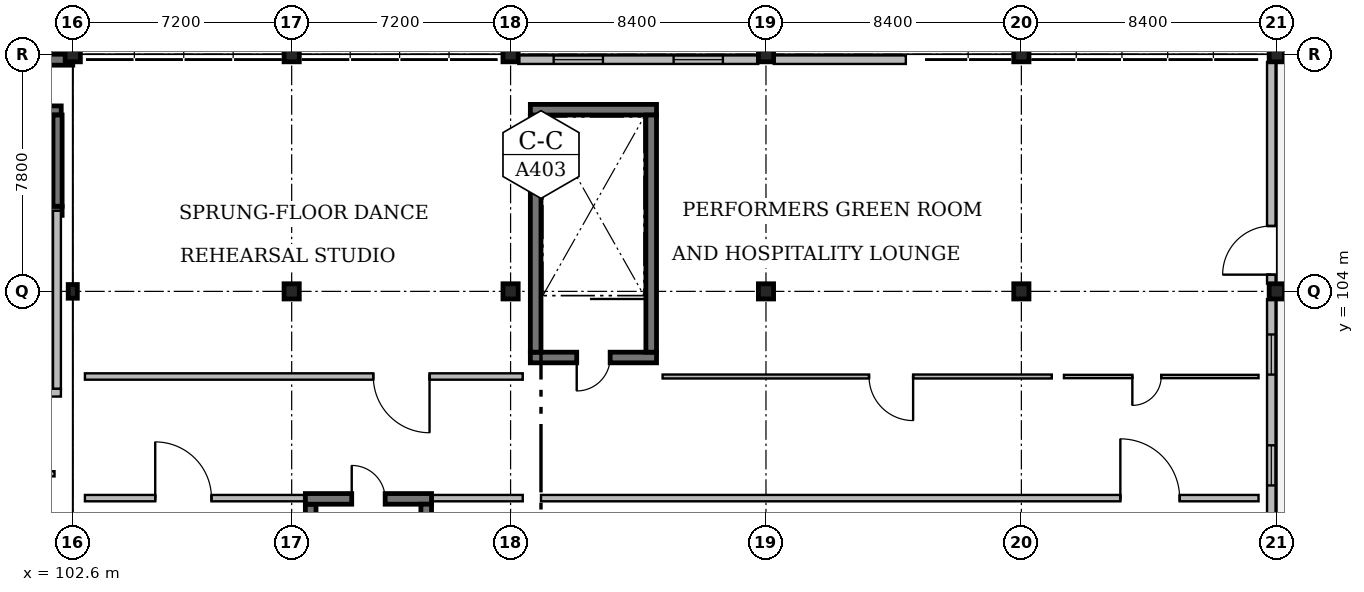
"""IFC4 building model, lengths in metres.
Left out: names, types, materials, properties, quantities, classifications, styles, units other than length and angle.
Written with IfcOpenShell. Run it as: python <this file> out.ifc"""

import sys

from ifc_helpers import new_model, si_unit, direction, frame, frame_2d, origin, origin_2d, place, context, subcontext, project, spatial, rectangle, i_section, extrude, element, fill, save


model = new_model("IFC4")
c1 = context("Model", 3, precision=1e-05, world=origin(), true_north=direction((0.0, 1.0)))
c2 = subcontext(c1, "Body", "Model", "MODEL_VIEW")
j1 = project(units=[si_unit("LENGTHUNIT", "METRE"), si_unit("PLANEANGLEUNIT", "RADIAN")], contexts=[c1])
p1 = place(None, origin())
s1 = spatial("IfcSite", under=j1, at=p1, CompositionType="ELEMENT")
p2 = place(p1, origin())
s2 = spatial("IfcBuilding", under=s1, at=p2, CompositionType="ELEMENT")
p3 = place(p2, frame((0.0, 0.0, 13.2)))
s3 = spatial("IfcBuildingStorey", under=s2, at=p3, CompositionType="ELEMENT", Elevation=13.2)
p4 = place(p3, frame((102.6, 104.0, 0.0), z_axis=(0.0, 0.0, 1.0), x_axis=(1.0, 0.0, 0.0)))
e1 = element("IfcColumn", 1, at=p4, inside=s3, PredefinedType="COLUMN", context=c2, shape_type="SweptSolid", body=[
    extrude(i_section(OverallWidth=0.3, OverallDepth=0.45, WebThickness=0.014, FlangeThickness=0.026, FilletRadius=0.027, at=origin_2d()), origin(), (0.0, 0.0, 1.0), 3.9),
])
p5 = place(p3, frame((102.6, 111.8, 0.0), z_axis=(0.0, 0.0, 1.0), x_axis=(1.0, 0.0, 0.0)))
e2 = element("IfcColumn", 2, at=p5, inside=s3, PredefinedType="COLUMN", context=c2, shape_type="SweptSolid", body=[
    extrude(rectangle(XDim=0.5, YDim=0.5, at=origin_2d()), origin(), (0.0, 0.0, 1.0), 3.9),
])
for number, where, z_axis, x_axis in (
    (3, (109.8, 104.0, 0.0), (0.0, 0.0, 1.0), (1.0, 0.0, 0.0)),
    (4, (109.8, 111.8, 0.0), (0.0, 0.0, 1.0), (1.0, 0.0, 0.0)),
    (5, (117.0, 104.0, 0.0), (0.0, 0.0, 1.0), (1.0, 0.0, 0.0)),
    (6, (117.0, 111.8, 0.0), (0.0, 0.0, 1.0), (1.0, 0.0, 0.0)),
    (7, (125.4, 104.0, 0.0), (0.0, 0.0, 1.0), (1.0, 0.0, 0.0)),
    (8, (125.4, 111.8, 0.0), (0.0, 0.0, 1.0), (1.0, 0.0, 0.0)),
    (9, (133.8, 104.0, 0.0), (0.0, 0.0, 1.0), (1.0, 0.0, 0.0)),
    (10, (133.8, 111.8, 0.0), (0.0, 0.0, 1.0), (1.0, 0.0, 0.0)),
    (11, (142.2, 104.0, 0.0), (0.0, 0.0, 1.0), (1.0, 0.0, 0.0)),
    (12, (142.2, 111.8, 0.0), (0.0, 0.0, 1.0), (1.0, 0.0, 0.0)),
):
    element("IfcColumn", number, at=place(p3, frame(where, z_axis=z_axis, x_axis=x_axis)), inside=s3, PredefinedType="COLUMN", context=c2, shape_type="SweptSolid", body=[
        extrude(rectangle(XDim=0.5, YDim=0.5, at=origin_2d()), origin(), (0.0, 0.0, 1.0), 3.71),
    ])
p6 = place(p3, frame((102.25, 106.65, 0.0), z_axis=(0.0, 0.0, 1.0), x_axis=(-1.0, 0.0, 0.0)))
e13 = element("IfcWall", 13, at=p6, inside=s3, PredefinedType="SOLIDWALL", context=c2, shape_type="SweptSolid", body=[
    extrude(rectangle(XDim=3.6, YDim=0.3, at=frame_2d((1.8, 0.0))), origin(), (0.0, 0.0, 1.0), 3.9),
])
p7 = place(p6, frame((1.25, 0.0, 0.0)))
e14 = element("IfcOpeningElement", 14, at=p7, cuts=e13, PredefinedType="OPENING", context=c2, shape_type="SweptSolid", body=[
    extrude(rectangle(XDim=1.1, YDim=2.1, at=frame_2d((0.55, 1.05))), frame((0.0, 0.17, 0.0), z_axis=(0.0, -1.0, 0.0), x_axis=(1.0, 0.0, 0.0)), (0.0, 0.0, 1.0), 0.34),
])
p8 = place(p3, frame((98.65, 109.95, 0.0), z_axis=(0.0, 0.0, 1.0), x_axis=(1.0, 0.0, 0.0)))
e15 = element("IfcWall", 15, at=p8, inside=s3, PredefinedType="SOLIDWALL", context=c2, shape_type="SweptSolid", body=[
    extrude(rectangle(XDim=3.57, YDim=0.3, at=frame_2d((1.785, 0.0))), origin(), (0.0, 0.0, 1.0), 3.9),
])
p9 = place(p3, frame((102.1, 109.8, 0.0), z_axis=(0.0, 0.0, 1.0), x_axis=(0.0, -1.0, 0.0)))
e16 = element("IfcWall", 16, at=p9, inside=s3, PredefinedType="SOLIDWALL", context=c2, shape_type="SweptSolid", body=[
    extrude(rectangle(XDim=3.0, YDim=0.3, at=frame_2d((1.5, 0.0))), origin(), (0.0, 0.0, 1.0), 3.9),
])
p10 = place(p3, frame((102.21, 100.67, 0.0), z_axis=(0.0, 0.0, 1.0), x_axis=(-1.0, 0.0, 0.0)))
e17 = element("IfcWall", 17, at=p10, inside=s3, PredefinedType="SOLIDWALL", context=c2, shape_type="SweptSolid", body=[
    extrude(rectangle(XDim=3.96, YDim=0.26, at=frame_2d((1.98, 0.0))), origin(), (0.0, 0.0, 1.0), 3.65),
])
p11 = place(p10, frame((1.1, 0.0, 0.0)))
e18 = element("IfcOpeningElement", 18, at=p11, cuts=e17, PredefinedType="OPENING", context=c2, shape_type="SweptSolid", body=[
    extrude(rectangle(XDim=1.15, YDim=2.2, at=frame_2d((0.575, 1.1))), frame((0.0, 0.15, 0.0), z_axis=(0.0, -1.0, 0.0), x_axis=(1.0, 0.0, 0.0)), (0.0, 0.0, 1.0), 0.3),
])
p12 = place(p3, frame((102.08, 106.65, 0.0), z_axis=(0.0, 0.0, 1.0), x_axis=(0.0, -1.0, 0.0)))
e19 = element("IfcWall", 19, at=p12, inside=s3, PredefinedType="SOLIDWALL", context=c2, shape_type="SweptSolid", body=[
    extrude(rectangle(XDim=5.85, YDim=0.26, at=frame_2d((2.925, 0.0))), origin(), (0.0, 0.0, 1.0), 3.65),
])
p13 = place(p3, frame((121.8, 101.825, 0.0), z_axis=(0.0, 0.0, 1.0), x_axis=(-1.0, 0.0, 0.0)))
e20 = element("IfcWall", 20, at=p13, inside=s3, PredefinedType="SOLIDWALL", context=c2, shape_type="SweptSolid", body=[
    extrude(rectangle(XDim=4.15, YDim=0.35, at=frame_2d((2.075, 0.0))), origin(), (0.0, 0.0, 1.0), 3.6),
])
p14 = place(p13, frame((1.525, 0.0, 0.0)))
e21 = element("IfcOpeningElement", 21, at=p14, cuts=e20, PredefinedType="OPENING", context=c2, shape_type="SweptSolid", body=[
    extrude(rectangle(XDim=1.1, YDim=2.15, at=frame_2d((0.55, 1.075))), frame((0.0, 0.195, 0.0), z_axis=(0.0, -1.0, 0.0), x_axis=(1.0, 0.0, 0.0)), (0.0, 0.0, 1.0), 0.39),
])
p15 = place(p3, frame((117.825, 102.0, 0.0), z_axis=(0.0, 0.0, 1.0), x_axis=(0.0, 1.0, 0.0)))
e22 = element("IfcWall", 22, at=p15, inside=s3, PredefinedType="SOLIDWALL", context=c2, shape_type="SweptSolid", body=[
    extrude(rectangle(XDim=7.8, YDim=0.35, at=frame_2d((3.9, 0.0))), origin(), (0.0, 0.0, 1.0), 3.6),
])
p16 = place(p3, frame((117.65, 109.975, 0.0), z_axis=(0.0, 0.0, 1.0), x_axis=(1.0, 0.0, 0.0)))
e23 = element("IfcWall", 23, at=p16, inside=s3, PredefinedType="SOLIDWALL", context=c2, shape_type="SweptSolid", body=[
    extrude(rectangle(XDim=4.15, YDim=0.35, at=frame_2d((2.075, 0.0))), origin(), (0.0, 0.0, 1.0), 3.6),
])
for number, where, z_axis, x_axis in (
    (24, (121.625, 109.8, 0.0), (0.0, 0.0, 1.0), (0.0, -1.0, 0.0)),
    (25, (110.425, 89.2, 0.0), (0.0, 0.0, 1.0), (0.0, 1.0, 0.0)),
):
    element("IfcWall", number, at=place(p3, frame(where, z_axis=z_axis, x_axis=x_axis)), inside=s3, PredefinedType="SOLIDWALL", context=c2, shape_type="SweptSolid", body=[
        extrude(rectangle(XDim=7.8, YDim=0.35, at=frame_2d((3.9, 0.0))), origin(), (0.0, 0.0, 1.0), 3.6),
    ])
p17 = place(p3, frame((110.25, 97.175, 0.0), z_axis=(0.0, 0.0, 1.0), x_axis=(1.0, 0.0, 0.0)))
e26 = element("IfcWall", 26, at=p17, inside=s3, PredefinedType="SOLIDWALL", context=c2, shape_type="SweptSolid", body=[
    extrude(rectangle(XDim=4.15, YDim=0.35, at=frame_2d((2.075, 0.0))), origin(), (0.0, 0.0, 1.0), 3.6),
])
p18 = place(p17, frame((1.525, 0.0, 0.0)))
e27 = element("IfcOpeningElement", 27, at=p18, cuts=e26, PredefinedType="OPENING", context=c2, shape_type="SweptSolid", body=[
    extrude(rectangle(XDim=1.1, YDim=2.15, at=frame_2d((0.55, 1.075))), frame((0.0, 0.195, 0.0), z_axis=(0.0, -1.0, 0.0), x_axis=(1.0, 0.0, 0.0)), (0.0, 0.0, 1.0), 0.39),
])
p19 = place(p3, frame((114.225, 97.0, 0.0), z_axis=(0.0, 0.0, 1.0), x_axis=(0.0, -1.0, 0.0)))
e28 = element("IfcWall", 28, at=p19, inside=s3, PredefinedType="SOLIDWALL", context=c2, shape_type="SweptSolid", body=[
    extrude(rectangle(XDim=7.8, YDim=0.35, at=frame_2d((3.9, 0.0))), origin(), (0.0, 0.0, 1.0), 3.6),
])
p20 = place(p3, frame((57.6, 111.62, 0.0), z_axis=(0.0, 0.0, 1.0), x_axis=(1.0, 0.0, 0.0)))
e29 = element("IfcWall", 29, at=p20, inside=s3, PredefinedType="SOLIDWALL", context=c2, shape_type="SweptSolid", body=[
    extrude(rectangle(XDim=45.0, YDim=0.36, at=frame_2d((22.5, 0.0))), origin(), (0.0, 0.0, 1.0), 3.65),
])
p21 = place(p3, frame((117.255, 111.62, 0.0), z_axis=(0.0, 0.0, 1.0), x_axis=(1.0, 0.0, 0.0)))
e30 = element("IfcWall", 30, at=p21, inside=s3, PredefinedType="SOLIDWALL", context=c2, shape_type="SweptSolid", body=[
    extrude(rectangle(XDim=7.89, YDim=0.28, at=frame_2d((3.945, 0.0))), origin(), (0.0, 0.0, 1.0), 2.993),
])
p22 = place(p21, frame((1.163, 0.0, 0.95)))
e31 = element("IfcOpeningElement", 31, at=p22, cuts=e30, PredefinedType="OPENING", context=c2, shape_type="SweptSolid", body=[
    extrude(rectangle(XDim=1.62, YDim=1.75, at=frame_2d((0.81, 0.875))), frame((0.0, 0.16, 0.0), z_axis=(0.0, -1.0, 0.0), x_axis=(1.0, 0.0, 0.0)), (0.0, 0.0, 1.0), 0.32),
])
p23 = place(p21, frame((5.107, 0.0, 0.95)))
e32 = element("IfcOpeningElement", 32, at=p23, cuts=e30, PredefinedType="OPENING", context=c2, shape_type="SweptSolid", body=[
    extrude(rectangle(XDim=1.62, YDim=1.75, at=frame_2d((0.81, 0.875))), frame((0.0, 0.16, 0.0), z_axis=(0.0, -1.0, 0.0), x_axis=(1.0, 0.0, 0.0)), (0.0, 0.0, 1.0), 0.32),
])
p24 = place(p3, frame((125.655, 111.62, 0.0), z_axis=(0.0, 0.0, 1.0), x_axis=(1.0, 0.0, 0.0)))
e33 = element("IfcWall", 33, at=p24, inside=s3, PredefinedType="SOLIDWALL", context=c2, shape_type="SweptSolid", body=[
    extrude(rectangle(XDim=4.345, YDim=0.28, at=frame_2d((2.172, 0.0))), origin(), (0.0, 0.0, 1.0), 2.993),
])
p25 = place(p3, frame((142.02, 96.455, 0.0), z_axis=(0.0, 0.0, 1.0), x_axis=(0.0, 1.0, 0.0)))
e34 = element("IfcWall", 34, at=p25, inside=s3, PredefinedType="SOLIDWALL", context=c2, shape_type="SweptSolid", body=[
    extrude(rectangle(XDim=7.29, YDim=0.28, at=frame_2d((3.645, 0.0))), origin(), (0.0, 0.0, 1.0), 3.283),
])
p26 = place(p25, frame((1.163, 0.0, 0.95)))
e35 = element("IfcOpeningElement", 35, at=p26, cuts=e34, PredefinedType="OPENING", context=c2, shape_type="SweptSolid", body=[
    extrude(rectangle(XDim=1.32, YDim=1.65, at=frame_2d((0.66, 0.825))), frame((0.0, 0.16, 0.0), z_axis=(0.0, -1.0, 0.0), x_axis=(1.0, 0.0, 0.0)), (0.0, 0.0, 1.0), 0.32),
])
p27 = place(p25, frame((4.808, 0.0, 0.95)))
e36 = element("IfcOpeningElement", 36, at=p27, cuts=e34, PredefinedType="OPENING", context=c2, shape_type="SweptSolid", body=[
    extrude(rectangle(XDim=1.32, YDim=1.65, at=frame_2d((0.66, 0.825))), frame((0.0, 0.16, 0.0), z_axis=(0.0, -1.0, 0.0), x_axis=(1.0, 0.0, 0.0)), (0.0, 0.0, 1.0), 0.32),
])
p28 = place(p3, frame((142.02, 104.255, 0.0), z_axis=(0.0, 0.0, 1.0), x_axis=(0.0, 1.0, 0.0)))
e37 = element("IfcWall", 37, at=p28, inside=s3, PredefinedType="SOLIDWALL", context=c2, shape_type="SweptSolid", body=[
    extrude(rectangle(XDim=7.29, YDim=0.28, at=frame_2d((3.645, 0.0))), origin(), (0.0, 0.0, 1.0), 3.283),
])
p29 = place(p28, frame((0.295, 0.0, 0.0)))
e38 = element("IfcOpeningElement", 38, at=p29, cuts=e37, PredefinedType="OPENING", context=c2, shape_type="SweptSolid", body=[
    extrude(rectangle(XDim=1.6, YDim=2.2, at=frame_2d((0.8, 1.1))), frame((0.0, 0.16, 0.0), z_axis=(0.0, -1.0, 0.0), x_axis=(1.0, 0.0, 0.0)), (0.0, 0.0, 1.0), 0.32),
])
p30 = place(p3, frame((90.2, 98.0, 0.0), z_axis=(0.0, 0.0, 1.0), x_axis=(1.0, 0.0, 0.0)))
e39 = element("IfcWall", 39, at=p30, inside=s3, PredefinedType="PARTITIONING", context=c2, shape_type="SweptSolid", body=[
    extrude(rectangle(XDim=11.8, YDim=0.17, at=frame_2d((5.9, 0.0))), origin(), (0.0, 0.0, 1.0), 3.65),
])
p31 = place(p30, frame((5.6, 0.0, 0.0)))
e40 = element("IfcOpeningElement", 40, at=p31, cuts=e39, PredefinedType="OPENING", context=c2, shape_type="SweptSolid", body=[
    extrude(rectangle(XDim=1.1, YDim=2.1, at=frame_2d((0.55, 1.05))), frame((0.0, 0.105, 0.0), z_axis=(0.0, -1.0, 0.0), x_axis=(1.0, 0.0, 0.0)), (0.0, 0.0, 1.0), 0.21),
])
p32 = place(p3, frame((103.0, 97.2, 0.0), z_axis=(0.0, 0.0, 1.0), x_axis=(1.0, 0.0, 0.0)))
e41 = element("IfcWall", 41, at=p32, inside=s3, PredefinedType="PARTITIONING", context=c2, shape_type="SweptSolid", body=[
    extrude(rectangle(XDim=7.21, YDim=0.21, at=frame_2d((3.605, 0.0))), origin(), (0.0, 0.0, 1.0), 3.66),
])
p33 = place(p32, frame((2.312, 0.0, 0.0)))
e42 = element("IfcOpeningElement", 42, at=p33, cuts=e41, PredefinedType="OPENING", context=c2, shape_type="SweptSolid", body=[
    extrude(rectangle(XDim=1.85, YDim=2.35, at=frame_2d((0.925, 1.175))), frame((0.0, 0.125, 0.0), z_axis=(0.0, -1.0, 0.0), x_axis=(1.0, 0.0, 0.0)), (0.0, 0.0, 1.0), 0.25),
])
p34 = place(p3, frame((114.44, 97.2, 0.0), z_axis=(0.0, 0.0, 1.0), x_axis=(1.0, 0.0, 0.0)))
e43 = element("IfcWall", 43, at=p34, inside=s3, PredefinedType="PARTITIONING", context=c2, shape_type="SweptSolid", body=[
    extrude(rectangle(XDim=2.96, YDim=0.21, at=frame_2d((1.48, 0.0))), origin(), (0.0, 0.0, 1.0), 3.66),
])
p35 = place(p3, frame((118.0, 97.2, 0.0), z_axis=(0.0, 0.0, 1.0), x_axis=(1.0, 0.0, 0.0)))
e44 = element("IfcWall", 44, at=p35, inside=s3, PredefinedType="PARTITIONING", context=c2, shape_type="SweptSolid", body=[
    extrude(rectangle(XDim=23.6, YDim=0.21, at=frame_2d((11.8, 0.0))), origin(), (0.0, 0.0, 1.0), 3.66),
])
p36 = place(p35, frame((19.055, 0.0, 0.0)))
e45 = element("IfcOpeningElement", 45, at=p36, cuts=e44, PredefinedType="OPENING", context=c2, shape_type="SweptSolid", body=[
    extrude(rectangle(XDim=1.95, YDim=2.4, at=frame_2d((0.975, 1.2))), frame((0.0, 0.125, 0.0), z_axis=(0.0, -1.0, 0.0), x_axis=(1.0, 0.0, 0.0)), (0.0, 0.0, 1.0), 0.25),
])
p37 = place(p3, frame((117.4, 101.2, 0.0), z_axis=(0.0, 0.0, 1.0), x_axis=(-1.0, 0.0, 0.0)))
e46 = element("IfcWall", 46, at=p37, inside=s3, PredefinedType="PARTITIONING", context=c2, shape_type="SweptSolid", body=[
    extrude(rectangle(XDim=14.4, YDim=0.21, at=frame_2d((7.2, 0.0))), origin(), (0.0, 0.0, 1.0), 3.66),
])
p38 = place(p37, frame((3.066, 0.0, 0.0)))
e47 = element("IfcOpeningElement", 47, at=p38, cuts=e46, PredefinedType="OPENING", context=c2, shape_type="SweptSolid", body=[
    extrude(rectangle(XDim=1.85, YDim=2.35, at=frame_2d((0.925, 1.175))), frame((0.0, 0.125, 0.0), z_axis=(0.0, -1.0, 0.0), x_axis=(1.0, 0.0, 0.0)), (0.0, 0.0, 1.0), 0.25),
])
p39 = place(p3, frame((134.8, 101.2, 0.0), z_axis=(0.0, 0.0, 1.0), x_axis=(-1.0, 0.0, 0.0)))
e48 = element("IfcWall", 48, at=p39, inside=s3, PredefinedType="PARTITIONING", context=c2, shape_type="SweptSolid", body=[
    extrude(rectangle(XDim=12.8, YDim=0.13, at=frame_2d((6.4, 0.0))), origin(), (0.0, 0.0, 1.0), 3.66),
])
p40 = place(p39, frame((4.561, 0.0, 0.0)))
e49 = element("IfcOpeningElement", 49, at=p40, cuts=e48, PredefinedType="OPENING", context=c2, shape_type="SweptSolid", body=[
    extrude(rectangle(XDim=1.45, YDim=2.2, at=frame_2d((0.725, 1.1))), frame((0.0, 0.085, 0.0), z_axis=(0.0, -1.0, 0.0), x_axis=(1.0, 0.0, 0.0)), (0.0, 0.0, 1.0), 0.17),
])
p41 = place(p3, frame((141.6, 101.2, 0.0), z_axis=(0.0, 0.0, 1.0), x_axis=(-1.0, 0.0, 0.0)))
e50 = element("IfcWall", 50, at=p41, inside=s3, PredefinedType="PARTITIONING", context=c2, shape_type="SweptSolid", body=[
    extrude(rectangle(XDim=6.4, YDim=0.11, at=frame_2d((3.2, 0.0))), origin(), (0.0, 0.0, 1.0), 3.66),
])
p42 = place(p41, frame((3.2, 0.0, 0.0)))
e51 = element("IfcOpeningElement", 51, at=p42, cuts=e50, PredefinedType="OPENING", context=c2, shape_type="SweptSolid", body=[
    extrude(rectangle(XDim=0.95, YDim=2.1, at=frame_2d((0.475, 1.05))), frame((0.0, 0.075, 0.0), z_axis=(0.0, -1.0, 0.0), x_axis=(1.0, 0.0, 0.0)), (0.0, 0.0, 1.0), 0.15),
])
p43 = place(p14, origin())
e52 = element("IfcDoor", 52, at=p43, inside=s3, OperationType="SINGLE_SWING_RIGHT", PredefinedType="DOOR", context=c2, shape_type="SweptSolid", body=[
    extrude(rectangle(XDim=1.1, YDim=2.15, at=frame_2d((0.55, 1.075))), frame((0.0, 0.025, 0.0), z_axis=(0.0, -1.0, 0.0), x_axis=(1.0, 0.0, 0.0)), (0.0, 0.0, 1.0), 0.05),
])
fill(e21, e52)
p44 = place(p18, origin())
e53 = element("IfcDoor", 53, at=p44, inside=s3, OperationType="SINGLE_SWING_LEFT", PredefinedType="DOOR", context=c2, shape_type="SweptSolid", body=[
    extrude(rectangle(XDim=1.1, YDim=2.15, at=frame_2d((0.55, 1.075))), frame((0.0, 0.025, 0.0), z_axis=(0.0, -1.0, 0.0), x_axis=(1.0, 0.0, 0.0)), (0.0, 0.0, 1.0), 0.05),
])
fill(e27, e53)
p45 = place(p22, origin())
e54 = element("IfcWindow", 54, at=p45, inside=s3, PartitioningType="SINGLE_PANEL", PredefinedType="WINDOW", context=c2, shape_type="SweptSolid", body=[
    extrude(rectangle(XDim=1.62, YDim=1.75, at=frame_2d((0.81, 0.875))), frame((0.0, 0.03, 0.0), z_axis=(0.0, -1.0, 0.0), x_axis=(1.0, 0.0, 0.0)), (0.0, 0.0, 1.0), 0.06),
])
fill(e31, e54)
p46 = place(p23, origin())
e55 = element("IfcWindow", 55, at=p46, inside=s3, PartitioningType="SINGLE_PANEL", PredefinedType="WINDOW", context=c2, shape_type="SweptSolid", body=[
    extrude(rectangle(XDim=1.62, YDim=1.75, at=frame_2d((0.81, 0.875))), frame((0.0, 0.03, 0.0), z_axis=(0.0, -1.0, 0.0), x_axis=(1.0, 0.0, 0.0)), (0.0, 0.0, 1.0), 0.06),
])
fill(e32, e55)
p47 = place(p26, origin())
e56 = element("IfcWindow", 56, at=p47, inside=s3, PartitioningType="SINGLE_PANEL", PredefinedType="WINDOW", context=c2, shape_type="SweptSolid", body=[
    extrude(rectangle(XDim=1.32, YDim=1.65, at=frame_2d((0.66, 0.825))), frame((0.0, 0.03, 0.0), z_axis=(0.0, -1.0, 0.0), x_axis=(1.0, 0.0, 0.0)), (0.0, 0.0, 1.0), 0.06),
])
fill(e35, e56)
p48 = place(p27, origin())
e57 = element("IfcWindow", 57, at=p48, inside=s3, PartitioningType="SINGLE_PANEL", PredefinedType="WINDOW", context=c2, shape_type="SweptSolid", body=[
    extrude(rectangle(XDim=1.32, YDim=1.65, at=frame_2d((0.66, 0.825))), frame((0.0, 0.03, 0.0), z_axis=(0.0, -1.0, 0.0), x_axis=(1.0, 0.0, 0.0)), (0.0, 0.0, 1.0), 0.06),
])
fill(e36, e57)
p49 = place(p29, origin())
e58 = element("IfcDoor", 58, at=p49, inside=s3, OperationType="SINGLE_SWING_LEFT", PredefinedType="DOOR", context=c2, shape_type="SweptSolid", body=[
    extrude(rectangle(XDim=1.6, YDim=2.2, at=frame_2d((0.8, 1.1))), frame((0.0, 0.025, 0.0), z_axis=(0.0, -1.0, 0.0), x_axis=(1.0, 0.0, 0.0)), (0.0, 0.0, 1.0), 0.05),
])
fill(e38, e58)
p50 = place(p33, origin())
e59 = element("IfcDoor", 59, at=p50, inside=s3, OperationType="DOUBLE_DOOR_SINGLE_SWING", PredefinedType="DOOR", context=c2, shape_type="SweptSolid", body=[
    extrude(rectangle(XDim=1.85, YDim=2.35, at=frame_2d((0.925, 1.175))), frame((0.0, 0.025, 0.0), z_axis=(0.0, -1.0, 0.0), x_axis=(1.0, 0.0, 0.0)), (0.0, 0.0, 1.0), 0.05),
])
fill(e42, e59)
p51 = place(p36, origin())
e60 = element("IfcDoor", 60, at=p51, inside=s3, OperationType="DOUBLE_DOOR_SINGLE_SWING", PredefinedType="DOOR", context=c2, shape_type="SweptSolid", body=[
    extrude(rectangle(XDim=1.95, YDim=2.4, at=frame_2d((0.975, 1.2))), frame((0.0, 0.025, 0.0), z_axis=(0.0, -1.0, 0.0), x_axis=(1.0, 0.0, 0.0)), (0.0, 0.0, 1.0), 0.05),
])
fill(e45, e60)
p52 = place(p38, origin())
e61 = element("IfcDoor", 61, at=p52, inside=s3, OperationType="DOUBLE_DOOR_SINGLE_SWING", PredefinedType="DOOR", context=c2, shape_type="SweptSolid", body=[
    extrude(rectangle(XDim=1.85, YDim=2.35, at=frame_2d((0.925, 1.175))), frame((0.0, 0.025, 0.0), z_axis=(0.0, -1.0, 0.0), x_axis=(1.0, 0.0, 0.0)), (0.0, 0.0, 1.0), 0.05),
])
fill(e47, e61)
p53 = place(p40, origin())
e62 = element("IfcDoor", 62, at=p53, inside=s3, OperationType="DOUBLE_DOOR_SINGLE_SWING", PredefinedType="DOOR", context=c2, shape_type="SweptSolid", body=[
    extrude(rectangle(XDim=1.45, YDim=2.2, at=frame_2d((0.725, 1.1))), frame((0.0, 0.025, 0.0), z_axis=(0.0, -1.0, 0.0), x_axis=(1.0, 0.0, 0.0)), (0.0, 0.0, 1.0), 0.05),
])
fill(e49, e62)
p54 = place(p42, origin())
e63 = element("IfcDoor", 63, at=p54, inside=s3, OperationType="SINGLE_SWING_RIGHT", PredefinedType="DOOR", context=c2, shape_type="SweptSolid", body=[
    extrude(rectangle(XDim=0.95, YDim=2.1, at=frame_2d((0.475, 1.05))), frame((0.0, 0.025, 0.0), z_axis=(0.0, -1.0, 0.0), x_axis=(1.0, 0.0, 0.0)), (0.0, 0.0, 1.0), 0.05),
])
fill(e51, e63)
save(model, sys.argv[1])
